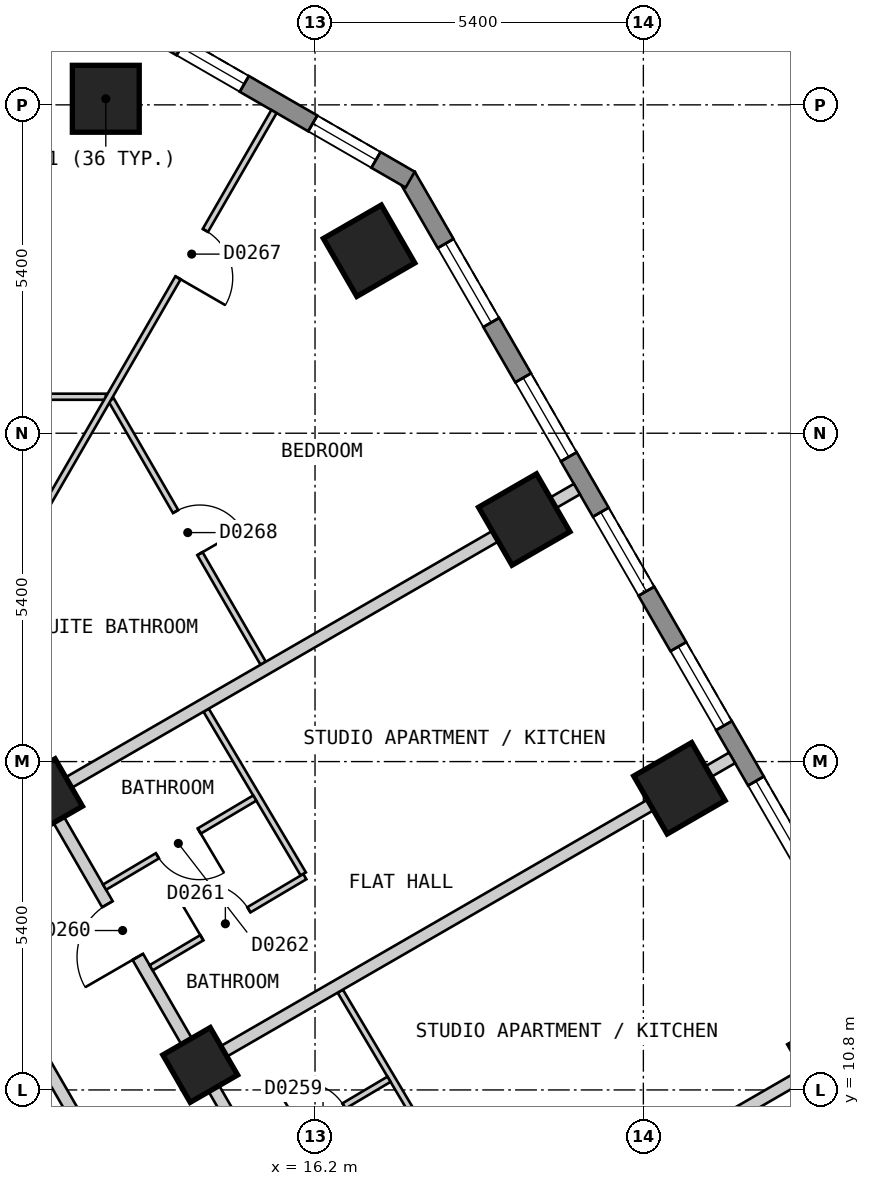
"""IFC4 building model, lengths in metres.
Left out: names, types, materials, properties, quantities, classifications, styles, units other than length and angle.
Written with IfcOpenShell. Run it as: python <this file> out.ifc"""

import sys

from ifc_helpers import new_model, si_unit, direction, frame, frame_2d, origin, origin_2d, place, context, subcontext, project, spatial, polyline, rectangle, outline, extrude, element, fill, save


model = new_model("IFC4")
c1 = context("Model", 3, precision=1e-05, world=origin(), true_north=direction((0.0, 1.0)))
c2 = subcontext(c1, "Body", "Model", "MODEL_VIEW")
j1 = project(units=[si_unit("LENGTHUNIT", "METRE"), si_unit("PLANEANGLEUNIT", "RADIAN")], contexts=[c1])
p1 = place(None, origin())
s1 = spatial("IfcSite", under=j1, at=p1, CompositionType="ELEMENT")
p2 = place(p1, origin())
s2 = spatial("IfcBuilding", under=s1, at=p2, CompositionType="ELEMENT")
p3 = place(p2, frame((0.0, 0.0, 47.4)))
s3 = spatial("IfcBuildingStorey", under=s2, at=p3, CompositionType="ELEMENT", Elevation=47.4)
for number, where, z_axis, x_axis in (
    (1, (12.759, 27.1, 0.0), (0.0, 0.0, 1.0), (-1.0, 0.0, 0.0)),
    (2, (24.745, 11.341, 0.0), (0.0, 0.0, 1.0), (-0.5, 0.866, 0.0)),
    (3, (22.193, 15.761, 0.0), (0.0, 0.0, 1.0), (-0.5, 0.866, 0.0)),
    (4, (19.641, 20.181, 0.0), (0.0, 0.0, 1.0), (-0.5, 0.866, 0.0)),
    (5, (17.089, 24.601, 0.0), (0.0, 0.0, 1.0), (-0.5, 0.866, 0.0)),
):
    element("IfcColumn", number, at=place(p3, frame(where, z_axis=z_axis, x_axis=x_axis)), inside=s3, PredefinedType="COLUMN", context=c2, shape_type="SweptSolid", body=[
        extrude(rectangle(XDim=1.1, YDim=1.1, at=origin_2d()), origin(), (0.0, 0.0, 1.0), 3.0),
    ])
for number, where, z_axis, x_axis in (
    (6, (14.312, 11.211, 0.0), (0.0, 0.0, 1.0), (-0.5, 0.866, 0.0)),
    (7, (11.76, 15.631, 0.0), (0.0, 0.0, 1.0), (-0.5, 0.866, 0.0)),
):
    element("IfcColumn", number, at=place(p3, frame(where, z_axis=z_axis, x_axis=x_axis)), inside=s3, PredefinedType="COLUMN", context=c2, shape_type="SweptSolid", body=[
        extrude(rectangle(XDim=0.9, YDim=0.9, at=origin_2d()), origin(), (0.0, 0.0, 1.0), 3.0),
    ])
p4 = place(p3, frame((31.22, 2.425, 0.0), z_axis=(0.0, 0.0, 1.0), x_axis=(-0.500001938803, 0.866024284413, 0.0)))
e8 = element("IfcWall", 8, at=p4, inside=s3, PredefinedType="SOLIDWALL", context=c2, shape_type="SweptSolid", body=[
    extrude(outline(polyline([(0.0, -0.15), (27.02, -0.15), (26.94, 0.15), (0.08, 0.15), (0.0, -0.15)])), origin(), (0.0, 0.0, 1.0), 2.7),
])
p5 = place(p4, frame((1.277, 0.0, 0.15)))
e9 = element("IfcOpeningElement", 9, at=p5, cuts=e8, PredefinedType="OPENING", context=c2, shape_type="SweptSolid", body=[
    extrude(rectangle(XDim=1.5, YDim=2.1, at=frame_2d((0.75, 1.05))), frame((0.0, 0.16, 0.0), z_axis=(0.0, -1.0, 0.0), x_axis=(1.0, 0.0, 0.0)), (0.0, 0.0, 1.0), 0.32),
])
p6 = place(p4, frame((3.829, 0.0, 0.15)))
e10 = element("IfcOpeningElement", 10, at=p6, cuts=e8, PredefinedType="OPENING", context=c2, shape_type="SweptSolid", body=[
    extrude(rectangle(XDim=1.5, YDim=2.1, at=frame_2d((0.75, 1.05))), frame((0.0, 0.16, 0.0), z_axis=(0.0, -1.0, 0.0), x_axis=(1.0, 0.0, 0.0)), (0.0, 0.0, 1.0), 0.32),
])
p7 = place(p4, frame((6.382, 0.0, 0.15)))
e11 = element("IfcOpeningElement", 11, at=p7, cuts=e8, PredefinedType="OPENING", context=c2, shape_type="SweptSolid", body=[
    extrude(rectangle(XDim=1.5, YDim=2.1, at=frame_2d((0.75, 1.05))), frame((0.0, 0.16, 0.0), z_axis=(0.0, -1.0, 0.0), x_axis=(1.0, 0.0, 0.0)), (0.0, 0.0, 1.0), 0.32),
])
p8 = place(p4, frame((8.933, 0.0, 0.15)))
e12 = element("IfcOpeningElement", 12, at=p8, cuts=e8, PredefinedType="OPENING", context=c2, shape_type="SweptSolid", body=[
    extrude(rectangle(XDim=1.5, YDim=2.1, at=frame_2d((0.75, 1.05))), frame((0.0, 0.16, 0.0), z_axis=(0.0, -1.0, 0.0), x_axis=(1.0, 0.0, 0.0)), (0.0, 0.0, 1.0), 0.32),
])
p9 = place(p4, frame((11.485, 0.0, 0.15)))
e13 = element("IfcOpeningElement", 13, at=p9, cuts=e8, PredefinedType="OPENING", context=c2, shape_type="SweptSolid", body=[
    extrude(rectangle(XDim=1.5, YDim=2.1, at=frame_2d((0.75, 1.05))), frame((0.0, 0.16, 0.0), z_axis=(0.0, -1.0, 0.0), x_axis=(1.0, 0.0, 0.0)), (0.0, 0.0, 1.0), 0.32),
])
p10 = place(p4, frame((14.037, 0.0, 0.15)))
e14 = element("IfcOpeningElement", 14, at=p10, cuts=e8, PredefinedType="OPENING", context=c2, shape_type="SweptSolid", body=[
    extrude(rectangle(XDim=1.5, YDim=2.1, at=frame_2d((0.75, 1.05))), frame((0.0, 0.16, 0.0), z_axis=(0.0, -1.0, 0.0), x_axis=(1.0, 0.0, 0.0)), (0.0, 0.0, 1.0), 0.32),
])
p11 = place(p4, frame((16.589, 0.0, 0.15)))
e15 = element("IfcOpeningElement", 15, at=p11, cuts=e8, PredefinedType="OPENING", context=c2, shape_type="SweptSolid", body=[
    extrude(rectangle(XDim=1.5, YDim=2.1, at=frame_2d((0.75, 1.05))), frame((0.0, 0.16, 0.0), z_axis=(0.0, -1.0, 0.0), x_axis=(1.0, 0.0, 0.0)), (0.0, 0.0, 1.0), 0.32),
])
p12 = place(p4, frame((19.141, 0.0, 0.15)))
e16 = element("IfcOpeningElement", 16, at=p12, cuts=e8, PredefinedType="OPENING", context=c2, shape_type="SweptSolid", body=[
    extrude(rectangle(XDim=1.5, YDim=2.1, at=frame_2d((0.75, 1.05))), frame((0.0, 0.16, 0.0), z_axis=(0.0, -1.0, 0.0), x_axis=(1.0, 0.0, 0.0)), (0.0, 0.0, 1.0), 0.32),
])
p13 = place(p4, frame((21.693, 0.0, 0.15)))
e17 = element("IfcOpeningElement", 17, at=p13, cuts=e8, PredefinedType="OPENING", context=c2, shape_type="SweptSolid", body=[
    extrude(rectangle(XDim=1.5, YDim=2.1, at=frame_2d((0.75, 1.05))), frame((0.0, 0.16, 0.0), z_axis=(0.0, -1.0, 0.0), x_axis=(1.0, 0.0, 0.0)), (0.0, 0.0, 1.0), 0.32),
])
p14 = place(p4, frame((24.244, 0.0, 0.15)))
e18 = element("IfcOpeningElement", 18, at=p14, cuts=e8, PredefinedType="OPENING", context=c2, shape_type="SweptSolid", body=[
    extrude(rectangle(XDim=1.5, YDim=2.1, at=frame_2d((0.75, 1.05))), frame((0.0, 0.16, 0.0), z_axis=(0.0, -1.0, 0.0), x_axis=(1.0, 0.0, 0.0)), (0.0, 0.0, 1.0), 0.32),
])
p15 = place(p3, frame((17.765, 25.77, 0.0), z_axis=(0.0, 0.0, 1.0), x_axis=(-0.866010750942, 0.50002537861, 0.0)))
e19 = element("IfcWall", 19, at=p15, inside=s3, PredefinedType="SOLIDWALL", context=c2, shape_type="SweptSolid", body=[
    extrude(outline(polyline([(0.0, -0.15), (5.0, -0.15), (4.919, 0.15), (0.08, 0.15), (0.0, -0.15)])), origin(), (0.0, 0.0, 1.0), 2.7),
])
p16 = place(p15, frame((0.65, 0.0, 0.15)))
e20 = element("IfcOpeningElement", 20, at=p16, cuts=e19, PredefinedType="OPENING", context=c2, shape_type="SweptSolid", body=[
    extrude(rectangle(XDim=1.2, YDim=2.1, at=frame_2d((0.6, 1.05))), frame((0.0, 0.16, 0.0), z_axis=(0.0, -1.0, 0.0), x_axis=(1.0, 0.0, 0.0)), (0.0, 0.0, 1.0), 0.32),
])
p17 = place(p15, frame((3.15, 0.0, 0.15)))
e21 = element("IfcOpeningElement", 21, at=p17, cuts=e19, PredefinedType="OPENING", context=c2, shape_type="SweptSolid", body=[
    extrude(rectangle(XDim=1.2, YDim=2.1, at=frame_2d((0.6, 1.05))), frame((0.0, 0.16, 0.0), z_axis=(0.0, -1.0, 0.0), x_axis=(1.0, 0.0, 0.0)), (0.0, 0.0, 1.0), 0.32),
])
p18 = place(p3, frame((9.18, 15.7, 0.0), z_axis=(0.0, 0.0, 1.0), x_axis=(0.500003652032, -0.866023295272, 0.0)))
e22 = element("IfcWall", 22, at=p18, inside=s3, PredefinedType="PARTITIONING", context=c2, shape_type="SweptSolid", body=[
    extrude(rectangle(XDim=18.012, YDim=0.2, at=frame_2d((9.006, 0.0))), origin(), (0.0, 0.0, 1.0), 2.7),
])
p19 = place(p18, frame((8.556, 0.0, 0.0)))
e23 = element("IfcOpeningElement", 23, at=p19, cuts=e22, PredefinedType="OPENING", context=c2, shape_type="SweptSolid", body=[
    extrude(rectangle(XDim=0.9, YDim=2.1, at=frame_2d((0.45, 1.05))), frame((0.0, 0.11, 0.0), z_axis=(0.0, -1.0, 0.0), x_axis=(1.0, 0.0, 0.0)), (0.0, 0.0, 1.0), 0.22),
])
p20 = place(p3, frame((10.45, 17.9, 0.0), z_axis=(0.0, 0.0, 1.0), x_axis=(0.500034352617, -0.866005569383, 0.0)))
e24 = element("IfcWall", 24, at=p20, inside=s3, PredefinedType="PARTITIONING", context=c2, shape_type="SweptSolid", body=[
    extrude(rectangle(XDim=20.553, YDim=0.2, at=frame_2d((10.276, 0.0))), origin(), (0.0, 0.0, 1.0), 2.7),
])
p21 = place(p20, frame((14.879, 0.0, 0.0)))
e25 = element("IfcOpeningElement", 25, at=p21, cuts=e24, PredefinedType="OPENING", context=c2, shape_type="SweptSolid", body=[
    extrude(rectangle(XDim=1.0, YDim=2.1, at=frame_2d((0.5, 1.05))), frame((0.0, 0.11, 0.0), z_axis=(0.0, -1.0, 0.0), x_axis=(1.0, 0.0, 0.0)), (0.0, 0.0, 1.0), 0.22),
])
p22 = place(p20, frame((9.775, 0.0, 0.0)))
e26 = element("IfcOpeningElement", 26, at=p22, cuts=e24, PredefinedType="OPENING", context=c2, shape_type="SweptSolid", body=[
    extrude(rectangle(XDim=1.0, YDim=2.1, at=frame_2d((0.5, 1.05))), frame((0.0, 0.11, 0.0), z_axis=(0.0, -1.0, 0.0), x_axis=(1.0, 0.0, 0.0)), (0.0, 0.0, 1.0), 0.22),
])
p23 = place(p20, frame((4.671, 0.0, 0.0)))
e27 = element("IfcOpeningElement", 27, at=p23, cuts=e24, PredefinedType="OPENING", context=c2, shape_type="SweptSolid", body=[
    extrude(rectangle(XDim=1.0, YDim=2.1, at=frame_2d((0.5, 1.05))), frame((0.0, 0.11, 0.0), z_axis=(0.0, -1.0, 0.0), x_axis=(1.0, 0.0, 0.0)), (0.0, 0.0, 1.0), 0.22),
])
p24 = place(p3, frame((16.615, 12.425, 0.0), z_axis=(0.0, 0.0, 1.0), x_axis=(0.510241930604, -0.860030913546, 0.0)))
e28 = element("IfcWall", 28, at=p24, inside=s3, PredefinedType="PARTITIONING", context=c2, shape_type="SweptSolid", body=[
    extrude(rectangle(XDim=3.136, YDim=0.1, at=frame_2d((1.568, 0.0))), origin(), (0.0, 0.0, 1.0), 2.7),
])
p25 = place(p3, frame((14.409, 17.045, 0.0), z_axis=(0.0, 0.0, 1.0), x_axis=(0.510362209222, -0.859959542884, 0.0)))
e29 = element("IfcWall", 29, at=p25, inside=s3, PredefinedType="PARTITIONING", context=c2, shape_type="SweptSolid", body=[
    extrude(rectangle(XDim=3.131, YDim=0.1, at=frame_2d((1.566, 0.0))), origin(), (0.0, 0.0, 1.0), 2.7),
])
p26 = place(p3, frame((12.846, 22.15, 0.0), z_axis=(0.0, 0.0, 1.0), x_axis=(0.500002715276, -0.866023836113, 0.0)))
e30 = element("IfcWall", 30, at=p26, inside=s3, PredefinedType="PARTITIONING", context=c2, shape_type="SweptSolid", body=[
    extrude(rectangle(XDim=5.002, YDim=0.1, at=frame_2d((2.501, 0.0))), origin(), (0.0, 0.0, 1.0), 2.7),
])
p27 = place(p26, frame((2.122, 0.0, 0.0)))
e31 = element("IfcOpeningElement", 31, at=p27, cuts=e30, PredefinedType="OPENING", context=c2, shape_type="SweptSolid", body=[
    extrude(rectangle(XDim=0.8, YDim=2.1, at=frame_2d((0.4, 1.05))), frame((0.0, 0.06, 0.0), z_axis=(0.0, -1.0, 0.0), x_axis=(1.0, 0.0, 0.0)), (0.0, 0.0, 1.0), 0.12),
])
p28 = place(p3, frame((7.755, 22.2, 0.0), z_axis=(0.0, 0.0, 1.0), x_axis=(1.0, 0.0, 0.0)))
e32 = element("IfcWall", 32, at=p28, inside=s3, PredefinedType="PARTITIONING", context=c2, shape_type="SweptSolid", body=[
    extrude(rectangle(XDim=5.005, YDim=0.1, at=frame_2d((2.502, 0.0))), origin(), (0.0, 0.0, 1.0), 2.7),
])
p29 = place(p28, frame((1.206, 0.0, 0.0)))
e33 = element("IfcOpeningElement", 33, at=p29, cuts=e32, PredefinedType="OPENING", context=c2, shape_type="SweptSolid", body=[
    extrude(rectangle(XDim=0.9, YDim=2.1, at=frame_2d((0.45, 1.05))), frame((0.0, 0.06, 0.0), z_axis=(0.0, -1.0, 0.0), x_axis=(1.0, 0.0, 0.0)), (0.0, 0.0, 1.0), 0.12),
])
p30 = place(p3, frame((10.393, 18.0, 0.0), z_axis=(0.0, 0.0, 1.0), x_axis=(0.499945497007, 0.866056868816, 0.0)))
e34 = element("IfcWall", 34, at=p30, inside=s3, PredefinedType="PARTITIONING", context=c2, shape_type="SweptSolid", body=[
    extrude(rectangle(XDim=10.265, YDim=0.1, at=frame_2d((5.132, 0.0))), origin(), (0.0, 0.0, 1.0), 2.7),
])
p31 = place(p30, frame((7.108, 0.0, 0.0)))
e35 = element("IfcOpeningElement", 35, at=p31, cuts=e34, PredefinedType="OPENING", context=c2, shape_type="SweptSolid", body=[
    extrude(rectangle(XDim=0.9, YDim=2.1, at=frame_2d((0.45, 1.05))), frame((0.0, 0.06, 0.0), z_axis=(0.0, -1.0, 0.0), x_axis=(1.0, 0.0, 0.0)), (0.0, 0.0, 1.0), 0.12),
])
p32 = place(p3, frame((13.505, 12.809, 0.0), z_axis=(0.0, 0.0, 1.0), x_axis=(0.860070102739, 0.510175870043, 0.0)))
e36 = element("IfcWall", 36, at=p32, inside=s3, PredefinedType="PARTITIONING", context=c2, shape_type="SweptSolid", body=[
    extrude(rectangle(XDim=2.938, YDim=0.1, at=frame_2d((1.469, 0.0))), origin(), (0.0, 0.0, 1.0), 2.7),
])
p33 = place(p32, frame((0.969, 0.0, 0.0)))
e37 = element("IfcOpeningElement", 37, at=p33, cuts=e36, PredefinedType="OPENING", context=c2, shape_type="SweptSolid", body=[
    extrude(rectangle(XDim=0.9, YDim=2.1, at=frame_2d((0.45, 1.05))), frame((0.0, 0.06, 0.0), z_axis=(0.0, -1.0, 0.0), x_axis=(1.0, 0.0, 0.0)), (0.0, 0.0, 1.0), 0.12),
])
p34 = place(p3, frame((12.739, 14.135, 0.0), z_axis=(0.0, 0.0, 1.0), x_axis=(0.860077414703, 0.510163543109, 0.0)))
e38 = element("IfcWall", 38, at=p34, inside=s3, PredefinedType="PARTITIONING", context=c2, shape_type="SweptSolid", body=[
    extrude(rectangle(XDim=2.872, YDim=0.1, at=frame_2d((1.436, 0.0))), origin(), (0.0, 0.0, 1.0), 2.7),
])
p35 = place(p34, frame((1.01, 0.0, 0.0)))
e39 = element("IfcOpeningElement", 39, at=p35, cuts=e38, PredefinedType="OPENING", context=c2, shape_type="SweptSolid", body=[
    extrude(rectangle(XDim=0.8, YDim=2.1, at=frame_2d((0.4, 1.05))), frame((0.0, 0.06, 0.0), z_axis=(0.0, -1.0, 0.0), x_axis=(1.0, 0.0, 0.0)), (0.0, 0.0, 1.0), 0.12),
])
p36 = place(p3, frame((15.291, 9.715, 0.0), z_axis=(0.0, 0.0, 1.0), x_axis=(0.860087708271, 0.510146188932, 0.0)))
e40 = element("IfcWall", 40, at=p36, inside=s3, PredefinedType="PARTITIONING", context=c2, shape_type="SweptSolid", body=[
    extrude(rectangle(XDim=2.472, YDim=0.1, at=frame_2d((1.236, 0.0))), origin(), (0.0, 0.0, 1.0), 2.7),
])
p37 = place(p36, frame((0.81, 0.0, 0.0)))
e41 = element("IfcOpeningElement", 41, at=p37, cuts=e40, PredefinedType="OPENING", context=c2, shape_type="SweptSolid", body=[
    extrude(rectangle(XDim=0.8, YDim=2.1, at=frame_2d((0.4, 1.05))), frame((0.0, 0.06, 0.0), z_axis=(0.0, -1.0, 0.0), x_axis=(1.0, 0.0, 0.0)), (0.0, 0.0, 1.0), 0.12),
])
for number, where, z_axis, x_axis in (
    (42, (16.95, 6.841, 0.0), (0.0, 0.0, 1.0), (0.866, 0.5, 0.0)),
    (43, (11.847, 15.681, 0.0), (0.0, 0.0, 1.0), (0.866, 0.5, 0.0)),
    (44, (14.399, 11.261, 0.0), (0.0, 0.0, 1.0), (0.866, 0.5, 0.0)),
):
    element("IfcWall", number, at=place(p3, frame(where, z_axis=z_axis, x_axis=x_axis)), inside=s3, PredefinedType="PARTITIONING", context=c2, shape_type="SweptSolid", body=[
        extrude(rectangle(XDim=10.0, YDim=0.2, at=frame_2d((5.0, 0.0))), origin(), (0.0, 0.0, 1.0), 2.7),
    ])
p38 = place(p10, origin())
e45 = element("IfcWindow", 45, at=p38, inside=s3, PartitioningType="SINGLE_PANEL", PredefinedType="WINDOW", context=c2, shape_type="SweptSolid", body=[
    extrude(rectangle(XDim=1.5, YDim=2.1, at=frame_2d((0.75, 1.05))), frame((0.0, 0.03, 0.0), z_axis=(0.0, -1.0, 0.0), x_axis=(1.0, 0.0, 0.0)), (0.0, 0.0, 1.0), 0.06),
])
fill(e14, e45)
p39 = place(p11, origin())
e46 = element("IfcWindow", 46, at=p39, inside=s3, PartitioningType="SINGLE_PANEL", PredefinedType="WINDOW", context=c2, shape_type="SweptSolid", body=[
    extrude(rectangle(XDim=1.5, YDim=2.1, at=frame_2d((0.75, 1.05))), frame((0.0, 0.03, 0.0), z_axis=(0.0, -1.0, 0.0), x_axis=(1.0, 0.0, 0.0)), (0.0, 0.0, 1.0), 0.06),
])
fill(e15, e46)
p40 = place(p12, origin())
e47 = element("IfcWindow", 47, at=p40, inside=s3, PartitioningType="SINGLE_PANEL", PredefinedType="WINDOW", context=c2, shape_type="SweptSolid", body=[
    extrude(rectangle(XDim=1.5, YDim=2.1, at=frame_2d((0.75, 1.05))), frame((0.0, 0.03, 0.0), z_axis=(0.0, -1.0, 0.0), x_axis=(1.0, 0.0, 0.0)), (0.0, 0.0, 1.0), 0.06),
])
fill(e16, e47)
p41 = place(p13, origin())
e48 = element("IfcWindow", 48, at=p41, inside=s3, PartitioningType="SINGLE_PANEL", PredefinedType="WINDOW", context=c2, shape_type="SweptSolid", body=[
    extrude(rectangle(XDim=1.5, YDim=2.1, at=frame_2d((0.75, 1.05))), frame((0.0, 0.03, 0.0), z_axis=(0.0, -1.0, 0.0), x_axis=(1.0, 0.0, 0.0)), (0.0, 0.0, 1.0), 0.06),
])
fill(e17, e48)
p42 = place(p14, origin())
e49 = element("IfcWindow", 49, at=p42, inside=s3, PartitioningType="SINGLE_PANEL", PredefinedType="WINDOW", context=c2, shape_type="SweptSolid", body=[
    extrude(rectangle(XDim=1.5, YDim=2.1, at=frame_2d((0.75, 1.05))), frame((0.0, 0.03, 0.0), z_axis=(0.0, -1.0, 0.0), x_axis=(1.0, 0.0, 0.0)), (0.0, 0.0, 1.0), 0.06),
])
fill(e18, e49)
p43 = place(p16, origin())
e50 = element("IfcWindow", 50, at=p43, inside=s3, PartitioningType="SINGLE_PANEL", PredefinedType="WINDOW", context=c2, shape_type="SweptSolid", body=[
    extrude(rectangle(XDim=1.2, YDim=2.1, at=frame_2d((0.6, 1.05))), frame((0.0, 0.03, 0.0), z_axis=(0.0, -1.0, 0.0), x_axis=(1.0, 0.0, 0.0)), (0.0, 0.0, 1.0), 0.06),
])
fill(e20, e50)
p44 = place(p17, origin())
e51 = element("IfcWindow", 51, at=p44, inside=s3, PartitioningType="SINGLE_PANEL", PredefinedType="WINDOW", context=c2, shape_type="SweptSolid", body=[
    extrude(rectangle(XDim=1.2, YDim=2.1, at=frame_2d((0.6, 1.05))), frame((0.0, 0.03, 0.0), z_axis=(0.0, -1.0, 0.0), x_axis=(1.0, 0.0, 0.0)), (0.0, 0.0, 1.0), 0.06),
])
fill(e21, e51)
p45 = place(p37, origin())
e52 = element("IfcDoor", 52, at=p45, inside=s3, OperationType="SINGLE_SWING_LEFT", PredefinedType="DOOR", context=c2, shape_type="SweptSolid", body=[
    extrude(rectangle(XDim=0.8, YDim=2.1, at=frame_2d((0.4, 1.05))), frame((0.0, 0.025, 0.0), z_axis=(0.0, -1.0, 0.0), x_axis=(1.0, 0.0, 0.0)), (0.0, 0.0, 1.0), 0.05),
])
fill(e41, e52)
p46 = place(p23, origin())
e53 = element("IfcDoor", 53, at=p46, inside=s3, OperationType="SINGLE_SWING_RIGHT", PredefinedType="DOOR", context=c2, shape_type="SweptSolid", body=[
    extrude(rectangle(XDim=1.0, YDim=2.1, at=frame_2d((0.5, 1.05))), frame((0.0, 0.025, 0.0), z_axis=(0.0, -1.0, 0.0), x_axis=(1.0, 0.0, 0.0)), (0.0, 0.0, 1.0), 0.05),
])
fill(e27, e53)
p47 = place(p33, origin())
e54 = element("IfcDoor", 54, at=p47, inside=s3, OperationType="SINGLE_SWING_LEFT", PredefinedType="DOOR", context=c2, shape_type="SweptSolid", body=[
    extrude(rectangle(XDim=0.9, YDim=2.1, at=frame_2d((0.45, 1.05))), frame((0.0, 0.025, 0.0), z_axis=(0.0, -1.0, 0.0), x_axis=(1.0, 0.0, 0.0)), (0.0, 0.0, 1.0), 0.05),
])
fill(e37, e54)
p48 = place(p35, origin())
e55 = element("IfcDoor", 55, at=p48, inside=s3, OperationType="SINGLE_SWING_RIGHT", PredefinedType="DOOR", context=c2, shape_type="SweptSolid", body=[
    extrude(rectangle(XDim=0.8, YDim=2.1, at=frame_2d((0.4, 1.05))), frame((0.0, 0.025, 0.0), z_axis=(0.0, -1.0, 0.0), x_axis=(1.0, 0.0, 0.0)), (0.0, 0.0, 1.0), 0.05),
])
fill(e39, e55)
p49 = place(p31, origin())
e56 = element("IfcDoor", 56, at=p49, inside=s3, OperationType="SINGLE_SWING_LEFT", PredefinedType="DOOR", context=c2, shape_type="SweptSolid", body=[
    extrude(rectangle(XDim=0.9, YDim=2.1, at=frame_2d((0.45, 1.05))), frame((0.0, 0.025, 0.0), z_axis=(0.0, -1.0, 0.0), x_axis=(1.0, 0.0, 0.0)), (0.0, 0.0, 1.0), 0.05),
])
fill(e35, e56)
p50 = place(p27, origin())
e57 = element("IfcDoor", 57, at=p50, inside=s3, OperationType="SINGLE_SWING_RIGHT", PredefinedType="DOOR", context=c2, shape_type="SweptSolid", body=[
    extrude(rectangle(XDim=0.8, YDim=2.1, at=frame_2d((0.4, 1.05))), frame((0.0, 0.025, 0.0), z_axis=(0.0, -1.0, 0.0), x_axis=(1.0, 0.0, 0.0)), (0.0, 0.0, 1.0), 0.05),
])
fill(e31, e57)
save(model, sys.argv[1])
